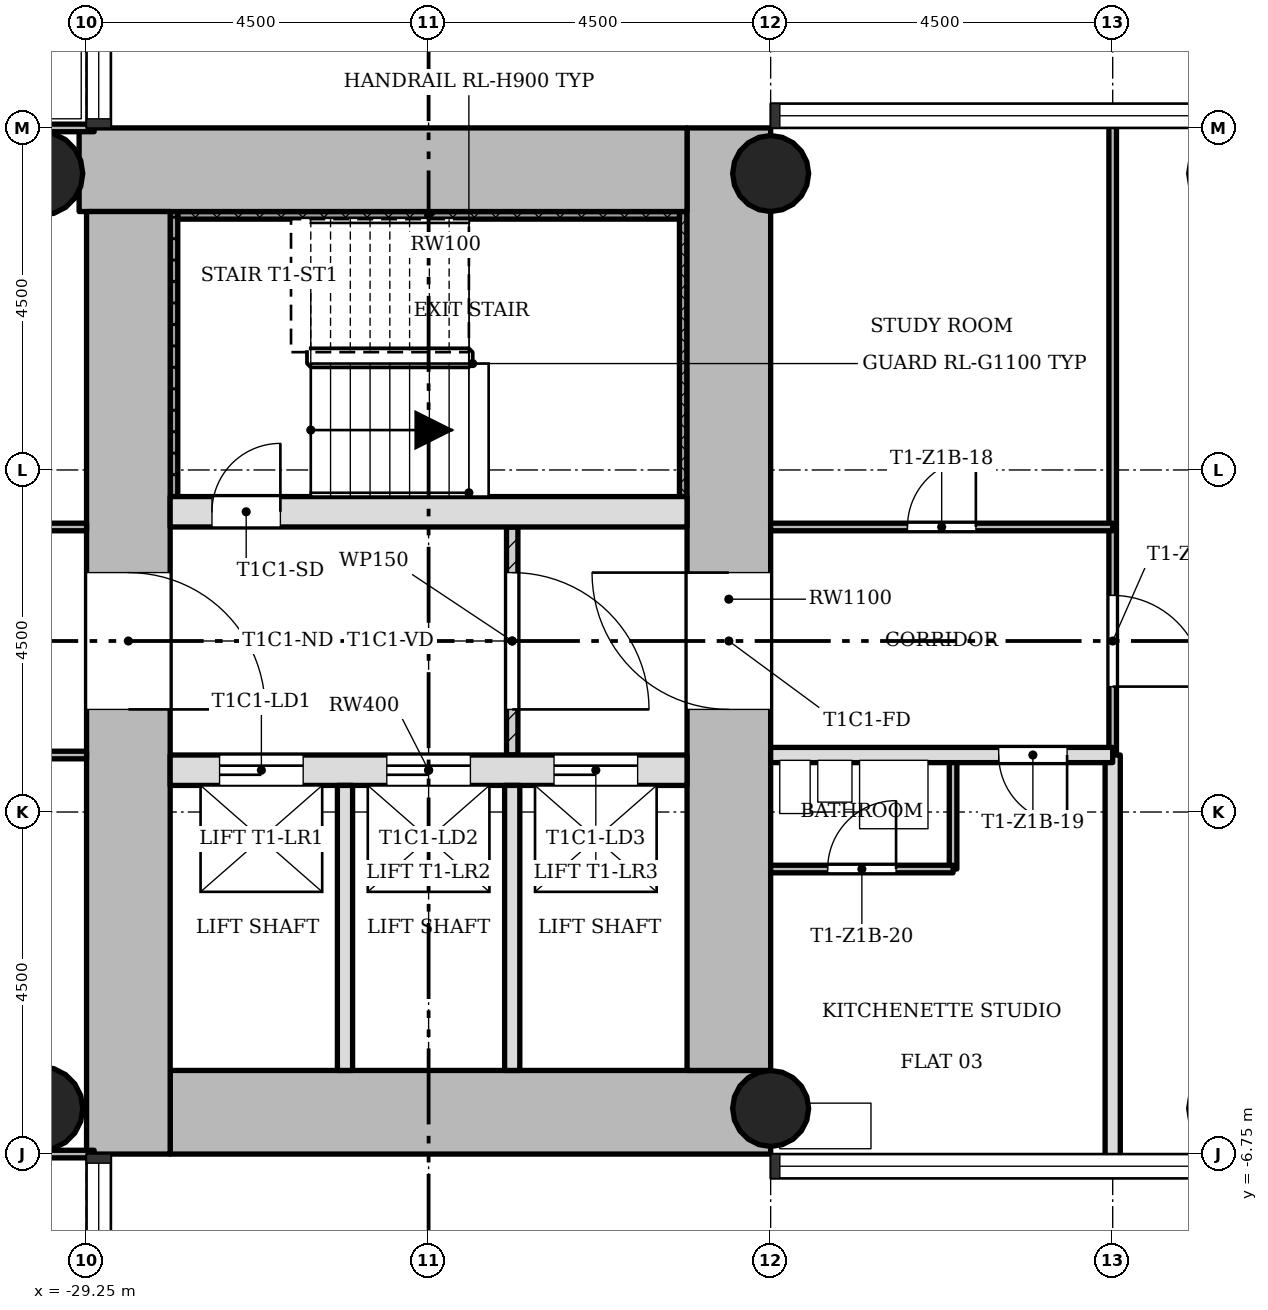
"""IFC4 building model, lengths in metres.
Left out: names, types, materials, properties, quantities, classifications, styles, units other than length and angle.
Written with IfcOpenShell. Run it as: python <this file> out.ifc"""

import sys

from ifc_helpers import new_model, si_unit, direction, frame, frame_2d, origin, origin_2d, place, context, subcontext, project, spatial, rectangle, hollow_circle, extrude, element, fill, save


model = new_model("IFC4")
c1 = context("Model", 3, precision=1e-05, world=origin(), true_north=direction((0.0, 1.0)))
c2 = subcontext(c1, "Body", "Model", "MODEL_VIEW")
j1 = project(units=[si_unit("LENGTHUNIT", "METRE"), si_unit("PLANEANGLEUNIT", "RADIAN")], contexts=[c1])
p1 = place(None, origin())
s1 = spatial("IfcSite", under=j1, at=p1, CompositionType="ELEMENT")
p2 = place(p1, origin())
s2 = spatial("IfcBuilding", under=s1, at=p2, CompositionType="ELEMENT")
p3 = place(p2, frame((0.0, 0.0, 41.5)))
s3 = spatial("IfcBuildingStorey", under=s2, at=p3, CompositionType="ELEMENT", Elevation=41.5)
p4 = place(p3, frame((-28.15, -6.2, 0.0), z_axis=(0.0, 0.0, 1.0), x_axis=(1.0, 0.0, 0.0)))
e1 = element("IfcWall", 1, at=p4, inside=s3, PredefinedType="SHEAR", context=c2, shape_type="SweptSolid", body=[
    extrude(rectangle(XDim=7.9, YDim=1.1, at=frame_2d((3.95, 0.0))), origin(), (0.0, 0.0, 1.0), 3.4),
])
p5 = place(p3, frame((-20.8, -5.65, 0.0), z_axis=(0.0, 0.0, 1.0), x_axis=(0.0, 1.0, 0.0)))
e2 = element("IfcWall", 2, at=p5, inside=s3, PredefinedType="SHEAR", context=c2, shape_type="SweptSolid", body=[
    extrude(rectangle(XDim=12.4, YDim=1.1, at=frame_2d((6.2, 0.0))), origin(), (0.0, 0.0, 1.0), 3.4),
])
p6 = place(p5, frame((4.75, 0.0, 0.0)))
e3 = element("IfcOpeningElement", 3, at=p6, cuts=e2, PredefinedType="OPENING", context=c2, shape_type="SweptSolid", body=[
    extrude(rectangle(XDim=1.8, YDim=2.1, at=frame_2d((0.9, 1.05))), frame((0.0, 0.56, 0.0), z_axis=(0.0, -1.0, 0.0), x_axis=(1.0, 0.0, 0.0)), (0.0, 0.0, 1.0), 1.12),
])
p7 = place(p3, frame((-21.35, 6.2, 0.0), z_axis=(0.0, 0.0, 1.0), x_axis=(-1.0, 0.0, 0.0)))
e4 = element("IfcWall", 4, at=p7, inside=s3, PredefinedType="SHEAR", context=c2, shape_type="SweptSolid", body=[
    extrude(rectangle(XDim=7.998, YDim=1.1, at=frame_2d((3.999, 0.0))), origin(), (0.0, 0.0, 1.0), 3.4),
])
p8 = place(p3, frame((-28.7, 5.65, 0.0), z_axis=(0.0, 0.0, 1.0), x_axis=(0.0, -1.0, 0.0)))
e5 = element("IfcWall", 5, at=p8, inside=s3, PredefinedType="SHEAR", context=c2, shape_type="SweptSolid", body=[
    extrude(rectangle(XDim=12.4, YDim=1.1, at=frame_2d((6.2, 0.0))), origin(), (0.0, 0.0, 1.0), 3.4),
])
p9 = place(p8, frame((4.75, 0.0, 0.0)))
e6 = element("IfcOpeningElement", 6, at=p9, cuts=e5, PredefinedType="OPENING", context=c2, shape_type="SweptSolid", body=[
    extrude(rectangle(XDim=1.8, YDim=2.1, at=frame_2d((0.9, 1.05))), frame((0.0, 0.56, 0.0), z_axis=(0.0, -1.0, 0.0), x_axis=(1.0, 0.0, 0.0)), (0.0, 0.0, 1.0), 1.12),
])
p10 = place(p3, frame((-28.15, -1.7, 0.0), z_axis=(0.0, 0.0, 1.0), x_axis=(1.0, 0.0, 0.0)))
e7 = element("IfcWall", 7, at=p10, inside=s3, PredefinedType="SHEAR", context=c2, shape_type="SweptSolid", body=[
    extrude(rectangle(XDim=6.8, YDim=0.4, at=frame_2d((3.4, 0.0))), origin(), (0.0, 0.0, 1.0), 3.4),
])
p11 = place(p10, frame((0.65, 0.0, 0.0)))
e8 = element("IfcOpeningElement", 8, at=p11, cuts=e7, PredefinedType="OPENING", context=c2, shape_type="SweptSolid", body=[
    extrude(rectangle(XDim=1.1, YDim=2.1, at=frame_2d((0.55, 1.05))), frame((0.0, 0.21, 0.0), z_axis=(0.0, -1.0, 0.0), x_axis=(1.0, 0.0, 0.0)), (0.0, 0.0, 1.0), 0.42),
])
p12 = place(p10, frame((2.85, 0.0, 0.0)))
e9 = element("IfcOpeningElement", 9, at=p12, cuts=e7, PredefinedType="OPENING", context=c2, shape_type="SweptSolid", body=[
    extrude(rectangle(XDim=1.1, YDim=2.1, at=frame_2d((0.55, 1.05))), frame((0.0, 0.21, 0.0), z_axis=(0.0, -1.0, 0.0), x_axis=(1.0, 0.0, 0.0)), (0.0, 0.0, 1.0), 0.42),
])
p13 = place(p10, frame((5.05, 0.0, 0.0)))
e10 = element("IfcOpeningElement", 10, at=p13, cuts=e7, PredefinedType="OPENING", context=c2, shape_type="SweptSolid", body=[
    extrude(rectangle(XDim=1.1, YDim=2.1, at=frame_2d((0.55, 1.05))), frame((0.0, 0.21, 0.0), z_axis=(0.0, -1.0, 0.0), x_axis=(1.0, 0.0, 0.0)), (0.0, 0.0, 1.0), 0.42),
])
p14 = place(p3, frame((-28.15, 1.7, 0.0), z_axis=(0.0, 0.0, 1.0), x_axis=(1.0, 0.0, 0.0)))
e11 = element("IfcWall", 11, at=p14, inside=s3, PredefinedType="SHEAR", context=c2, shape_type="SweptSolid", body=[
    extrude(rectangle(XDim=6.8, YDim=0.4, at=frame_2d((3.4, 0.0))), origin(), (0.0, 0.0, 1.0), 3.4),
])
p15 = place(p14, frame((0.55, 0.0, 0.0)))
e12 = element("IfcOpeningElement", 12, at=p15, cuts=e11, PredefinedType="OPENING", context=c2, shape_type="SweptSolid", body=[
    extrude(rectangle(XDim=0.9, YDim=2.1, at=frame_2d((0.45, 1.05))), frame((0.0, 0.21, 0.0), z_axis=(0.0, -1.0, 0.0), x_axis=(1.0, 0.0, 0.0)), (0.0, 0.0, 1.0), 0.42),
])
for number, where, z_axis, x_axis in (
    (13, (-20.25, -6.15, 0.0), (0.0, 0.0, 1.0), (1.0, 0.0, 0.0)),
    (14, (-20.25, 6.15, 0.0), (0.0, 0.0, 1.0), (1.0, 0.0, 0.0)),
):
    element("IfcColumn", number, at=place(p3, frame(where, z_axis=z_axis, x_axis=x_axis)), inside=s3, PredefinedType="COLUMN", context=c2, shape_type="SweptSolid", body=[
        extrude(hollow_circle(Radius=0.5, WallThickness=0.036, at=origin_2d()), origin(), (0.0, 0.0, 1.0), 3.4),
    ])
for number, where, z_axis, x_axis in (
    (15, (-29.85, -6.15, 0.0), (0.0, 0.0, 1.0), (1.0, 0.0, 0.0)),
    (16, (-29.85, 6.15, 0.0), (0.0, 0.0, 1.0), (1.0, 0.0, 0.0)),
):
    element("IfcColumn", number, at=place(p3, frame(where, z_axis=z_axis, x_axis=x_axis)), inside=s3, PredefinedType="COLUMN", context=c2, shape_type="SweptSolid", body=[
        extrude(hollow_circle(Radius=0.55, WallThickness=0.04, at=origin_2d()), origin(), (0.0, 0.0, 1.0), 3.4),
    ])
p16 = place(p3, frame((-23.65, -1.5, 0.0), z_axis=(0.0, 0.0, 1.0), x_axis=(0.0, 1.0, 0.0)))
e17 = element("IfcWall", 17, at=p16, inside=s3, PredefinedType="PARTITIONING", context=c2, shape_type="SweptSolid", body=[
    extrude(rectangle(XDim=3.0, YDim=0.15, at=frame_2d((1.5, 0.0))), origin(), (0.0, 0.0, 1.0), 3.0),
])
p17 = place(p16, frame((0.6, 0.0, 0.0)))
e18 = element("IfcOpeningElement", 18, at=p17, cuts=e17, PredefinedType="OPENING", context=c2, shape_type="SweptSolid", body=[
    extrude(rectangle(XDim=1.8, YDim=2.1, at=frame_2d((0.9, 1.05))), frame((0.0, 0.085, 0.0), z_axis=(0.0, -1.0, 0.0), x_axis=(1.0, 0.0, 0.0)), (0.0, 0.0, 1.0), 0.17),
])
for number, where, z_axis, x_axis in (
    (19, (-25.85, -5.65, 0.0), (0.0, 0.0, 1.0), (0.0, 1.0, 0.0)),
    (20, (-23.65, -5.65, 0.0), (0.0, 0.0, 1.0), (0.0, 1.0, 0.0)),
):
    element("IfcWall", number, at=place(p3, frame(where, z_axis=z_axis, x_axis=x_axis)), inside=s3, PredefinedType="SOLIDWALL", context=c2, shape_type="SweptSolid", body=[
        extrude(rectangle(XDim=3.75, YDim=0.2, at=frame_2d((1.875, 0.0))), origin(), (0.0, 0.0, 1.0), 3.0),
    ])
p18 = place(p3, frame((-17.85, -3.0, 0.0), z_axis=(0.0, 0.0, 1.0), x_axis=(0.0, 1.0, 0.0)))
e21 = element("IfcWall", 21, at=p18, inside=s3, PredefinedType="PARTITIONING", context=c2, shape_type="SweptSolid", body=[
    extrude(rectangle(XDim=1.5, YDim=0.1, at=frame_2d((0.75, 0.0))), origin(), (0.0, 0.0, 1.0), 3.0),
])
p19 = place(p3, frame((-15.75, -1.5, 0.0), z_axis=(0.0, 0.0, 1.0), x_axis=(0.0, 1.0, 0.0)))
e22 = element("IfcWall", 22, at=p19, inside=s3, PredefinedType="PARTITIONING", context=c2, shape_type="SweptSolid", body=[
    extrude(rectangle(XDim=8.35, YDim=0.1, at=frame_2d((4.175, 0.0))), origin(), (0.0, 0.0, 1.0), 3.0),
])
p20 = place(p19, frame((0.9, 0.0, 0.0)))
e23 = element("IfcOpeningElement", 23, at=p20, cuts=e22, PredefinedType="OPENING", context=c2, shape_type="SweptSolid", body=[
    extrude(rectangle(XDim=1.2, YDim=2.1, at=frame_2d((0.6, 1.05))), frame((0.0, 0.06, 0.0), z_axis=(0.0, -1.0, 0.0), x_axis=(1.0, 0.0, 0.0)), (0.0, 0.0, 1.0), 0.12),
])
p21 = place(p3, frame((-15.75, -6.85, 0.0), z_axis=(0.0, 0.0, 1.0), x_axis=(0.0, 1.0, 0.0)))
e24 = element("IfcWall", 24, at=p21, inside=s3, PredefinedType="SOLIDWALL", context=c2, shape_type="SweptSolid", body=[
    extrude(rectangle(XDim=5.35, YDim=0.2, at=frame_2d((2.675, 0.0))), origin(), (0.0, 0.0, 1.0), 3.0),
])
p22 = place(p3, frame((-35.1, -6.75, 0.0), z_axis=(0.0, 0.0, 1.0), x_axis=(1.0, 0.0, 0.0)))
e25 = element("IfcWall", 25, at=p22, inside=s3, PredefinedType="PARTITIONING", context=c2, shape_type="SweptSolid", body=[
    extrude(rectangle(XDim=5.95, YDim=0.1, at=frame_2d((2.975, 0.0))), origin(), (0.0, 0.0, 1.0), 3.0),
])
p23 = place(p3, frame((-20.25, -3.0, 0.0), z_axis=(0.0, 0.0, 1.0), x_axis=(1.0, 0.0, 0.0)))
e26 = element("IfcWall", 26, at=p23, inside=s3, PredefinedType="PARTITIONING", context=c2, shape_type="SweptSolid", body=[
    extrude(rectangle(XDim=2.4, YDim=0.1, at=frame_2d((1.2, 0.0))), origin(), (0.0, 0.0, 1.0), 3.0),
])
p24 = place(p23, frame((0.75, 0.0, 0.0)))
e27 = element("IfcOpeningElement", 27, at=p24, cuts=e26, PredefinedType="OPENING", context=c2, shape_type="SweptSolid", body=[
    extrude(rectangle(XDim=0.9, YDim=2.1, at=frame_2d((0.45, 1.05))), frame((0.0, 0.06, 0.0), z_axis=(0.0, -1.0, 0.0), x_axis=(1.0, 0.0, 0.0)), (0.0, 0.0, 1.0), 0.12),
])
p25 = place(p3, frame((-35.1, -1.5, 0.0), z_axis=(0.0, 0.0, 1.0), x_axis=(1.0, 0.0, 0.0)))
e28 = element("IfcWall", 28, at=p25, inside=s3, PredefinedType="PARTITIONING", context=c2, shape_type="SweptSolid", body=[
    extrude(rectangle(XDim=5.85, YDim=0.1, at=frame_2d((2.925, 0.0))), origin(), (0.0, 0.0, 1.0), 3.0),
])
p26 = place(p25, frame((2.475, 0.0, 0.0)))
e29 = element("IfcOpeningElement", 29, at=p26, cuts=e28, PredefinedType="OPENING", context=c2, shape_type="SweptSolid", body=[
    extrude(rectangle(XDim=0.9, YDim=2.1, at=frame_2d((0.45, 1.05))), frame((0.0, 0.06, 0.0), z_axis=(0.0, -1.0, 0.0), x_axis=(1.0, 0.0, 0.0)), (0.0, 0.0, 1.0), 0.12),
])
p27 = place(p3, frame((-20.25, -1.5, 0.0), z_axis=(0.0, 0.0, 1.0), x_axis=(1.0, 0.0, 0.0)))
e30 = element("IfcWall", 30, at=p27, inside=s3, PredefinedType="SOLIDWALL", context=c2, shape_type="SweptSolid", body=[
    extrude(rectangle(XDim=4.5, YDim=0.2, at=frame_2d((2.25, 0.0))), origin(), (0.0, 0.0, 1.0), 3.0),
])
p28 = place(p27, frame((3.0, 0.0, 0.0)))
e31 = element("IfcOpeningElement", 31, at=p28, cuts=e30, PredefinedType="OPENING", context=c2, shape_type="SweptSolid", body=[
    extrude(rectangle(XDim=0.9, YDim=2.1, at=frame_2d((0.45, 1.05))), frame((0.0, 0.11, 0.0), z_axis=(0.0, -1.0, 0.0), x_axis=(1.0, 0.0, 0.0)), (0.0, 0.0, 1.0), 0.22),
])
p29 = place(p3, frame((-35.1, 1.5, 0.0), z_axis=(0.0, 0.0, 1.0), x_axis=(1.0, 0.0, 0.0)))
e32 = element("IfcWall", 32, at=p29, inside=s3, PredefinedType="PARTITIONING", context=c2, shape_type="SweptSolid", body=[
    extrude(rectangle(XDim=5.85, YDim=0.1, at=frame_2d((2.925, 0.0))), origin(), (0.0, 0.0, 1.0), 3.0),
])
p30 = place(p29, frame((3.375, 0.0, 0.0)))
e33 = element("IfcOpeningElement", 33, at=p30, cuts=e32, PredefinedType="OPENING", context=c2, shape_type="SweptSolid", body=[
    extrude(rectangle(XDim=0.9, YDim=2.1, at=frame_2d((0.45, 1.05))), frame((0.0, 0.06, 0.0), z_axis=(0.0, -1.0, 0.0), x_axis=(1.0, 0.0, 0.0)), (0.0, 0.0, 1.0), 0.12),
])
p31 = place(p3, frame((-20.25, 1.5, 0.0), z_axis=(0.0, 0.0, 1.0), x_axis=(1.0, 0.0, 0.0)))
e34 = element("IfcWall", 34, at=p31, inside=s3, PredefinedType="PARTITIONING", context=c2, shape_type="SweptSolid", body=[
    extrude(rectangle(XDim=4.5, YDim=0.1, at=frame_2d((2.25, 0.0))), origin(), (0.0, 0.0, 1.0), 3.0),
])
p32 = place(p31, frame((1.8, 0.0, 0.0)))
e35 = element("IfcOpeningElement", 35, at=p32, cuts=e34, PredefinedType="OPENING", context=c2, shape_type="SweptSolid", body=[
    extrude(rectangle(XDim=0.9, YDim=2.1, at=frame_2d((0.45, 1.05))), frame((0.0, 0.06, 0.0), z_axis=(0.0, -1.0, 0.0), x_axis=(1.0, 0.0, 0.0)), (0.0, 0.0, 1.0), 0.12),
])
p33 = place(p3, frame((-35.1, 6.75, 0.0), z_axis=(0.0, 0.0, 1.0), x_axis=(1.0, 0.0, 0.0)))
e36 = element("IfcWall", 36, at=p33, inside=s3, PredefinedType="PARTITIONING", context=c2, shape_type="SweptSolid", body=[
    extrude(rectangle(XDim=5.95, YDim=0.1, at=frame_2d((2.975, 0.0))), origin(), (0.0, 0.0, 1.0), 3.0),
])
p34 = place(p3, frame((-21.4, 1.9, 0.0), z_axis=(0.0, 0.0, 1.0), x_axis=(0.0, 1.0, 0.0)))
e37 = element("IfcWall", 37, at=p34, inside=s3, PredefinedType="SHEAR", context=c2, shape_type="SweptSolid", body=[
    extrude(rectangle(XDim=3.75, YDim=0.1, at=frame_2d((1.875, 0.0))), origin(), (0.0, 0.0, 1.0), 3.4),
])
p35 = place(p3, frame((-28.05, 5.6, 0.0), z_axis=(0.0, 0.0, 1.0), x_axis=(1.0, 0.0, 0.0)))
e38 = element("IfcWall", 38, at=p35, inside=s3, PredefinedType="SHEAR", context=c2, shape_type="SweptSolid", body=[
    extrude(rectangle(XDim=6.6, YDim=0.1, at=frame_2d((3.3, 0.0))), origin(), (0.0, 0.0, 1.0), 3.4),
])
p36 = place(p3, frame((-28.1, 1.9, 0.0), z_axis=(0.0, 0.0, 1.0), x_axis=(0.0, 1.0, 0.0)))
e39 = element("IfcWall", 39, at=p36, inside=s3, PredefinedType="SHEAR", context=c2, shape_type="SweptSolid", body=[
    extrude(rectangle(XDim=3.75, YDim=0.1, at=frame_2d((1.875, 0.0))), origin(), (0.0, 0.0, 1.0), 3.4),
])
p37 = place(p17, origin())
e40 = element("IfcDoor", 40, at=p37, inside=s3, OperationType="SINGLE_SWING_LEFT", PredefinedType="DOOR", context=c2, shape_type="SweptSolid", body=[
    extrude(rectangle(XDim=1.8, YDim=2.1, at=frame_2d((0.9, 1.05))), frame((0.0, 0.025, 0.0), z_axis=(0.0, -1.0, 0.0), x_axis=(1.0, 0.0, 0.0)), (0.0, 0.0, 1.0), 0.05),
])
fill(e18, e40)
p38 = place(p32, origin())
e41 = element("IfcDoor", 41, at=p38, inside=s3, OperationType="SINGLE_SWING_LEFT", PredefinedType="DOOR", context=c2, shape_type="SweptSolid", body=[
    extrude(rectangle(XDim=0.9, YDim=2.1, at=frame_2d((0.45, 1.05))), frame((0.0, 0.025, 0.0), z_axis=(0.0, -1.0, 0.0), x_axis=(1.0, 0.0, 0.0)), (0.0, 0.0, 1.0), 0.05),
])
fill(e35, e41)
p39 = place(p28, origin())
e42 = element("IfcDoor", 42, at=p39, inside=s3, OperationType="SINGLE_SWING_RIGHT", PredefinedType="DOOR", context=c2, shape_type="SweptSolid", body=[
    extrude(rectangle(XDim=0.9, YDim=2.1, at=frame_2d((0.45, 1.05))), frame((0.0, 0.025, 0.0), z_axis=(0.0, -1.0, 0.0), x_axis=(1.0, 0.0, 0.0)), (0.0, 0.0, 1.0), 0.05),
])
fill(e31, e42)
p40 = place(p24, origin())
e43 = element("IfcDoor", 43, at=p40, inside=s3, OperationType="SINGLE_SWING_LEFT", PredefinedType="DOOR", context=c2, shape_type="SweptSolid", body=[
    extrude(rectangle(XDim=0.9, YDim=2.1, at=frame_2d((0.45, 1.05))), frame((0.0, 0.025, 0.0), z_axis=(0.0, -1.0, 0.0), x_axis=(1.0, 0.0, 0.0)), (0.0, 0.0, 1.0), 0.05),
])
fill(e27, e43)
p41 = place(p20, origin())
e44 = element("IfcDoor", 44, at=p41, inside=s3, OperationType="SINGLE_SWING_LEFT", PredefinedType="DOOR", context=c2, shape_type="SweptSolid", body=[
    extrude(rectangle(XDim=1.2, YDim=2.1, at=frame_2d((0.6, 1.05))), frame((0.0, 0.025, 0.0), z_axis=(0.0, -1.0, 0.0), x_axis=(1.0, 0.0, 0.0)), (0.0, 0.0, 1.0), 0.05),
])
fill(e23, e44)
p42 = place(p15, origin())
e45 = element("IfcDoor", 45, at=p42, inside=s3, OperationType="SINGLE_SWING_LEFT", PredefinedType="DOOR", context=c2, shape_type="SweptSolid", body=[
    extrude(rectangle(XDim=0.9, YDim=2.1, at=frame_2d((0.45, 1.05))), frame((0.0, 0.025, 0.0), z_axis=(0.0, -1.0, 0.0), x_axis=(1.0, 0.0, 0.0)), (0.0, 0.0, 1.0), 0.05),
])
fill(e12, e45)
p43 = place(p11, origin())
e46 = element("IfcDoor", 46, at=p43, inside=s3, OperationType="SLIDING_TO_LEFT", PredefinedType="DOOR", context=c2, shape_type="SweptSolid", body=[
    extrude(rectangle(XDim=1.1, YDim=2.1, at=frame_2d((0.55, 1.05))), frame((0.0, 0.025, 0.0), z_axis=(0.0, -1.0, 0.0), x_axis=(1.0, 0.0, 0.0)), (0.0, 0.0, 1.0), 0.05),
])
fill(e8, e46)
p44 = place(p12, origin())
e47 = element("IfcDoor", 47, at=p44, inside=s3, OperationType="SLIDING_TO_LEFT", PredefinedType="DOOR", context=c2, shape_type="SweptSolid", body=[
    extrude(rectangle(XDim=1.1, YDim=2.1, at=frame_2d((0.55, 1.05))), frame((0.0, 0.025, 0.0), z_axis=(0.0, -1.0, 0.0), x_axis=(1.0, 0.0, 0.0)), (0.0, 0.0, 1.0), 0.05),
])
fill(e9, e47)
p45 = place(p13, origin())
e48 = element("IfcDoor", 48, at=p45, inside=s3, OperationType="SLIDING_TO_LEFT", PredefinedType="DOOR", context=c2, shape_type="SweptSolid", body=[
    extrude(rectangle(XDim=1.1, YDim=2.1, at=frame_2d((0.55, 1.05))), frame((0.0, 0.025, 0.0), z_axis=(0.0, -1.0, 0.0), x_axis=(1.0, 0.0, 0.0)), (0.0, 0.0, 1.0), 0.05),
])
fill(e10, e48)
p46 = place(p9, origin())
e49 = element("IfcDoor", 49, at=p46, inside=s3, OperationType="SINGLE_SWING_LEFT", PredefinedType="DOOR", context=c2, shape_type="SweptSolid", body=[
    extrude(rectangle(XDim=1.8, YDim=2.1, at=frame_2d((0.9, 1.05))), frame((0.0, 0.025, 0.0), z_axis=(0.0, -1.0, 0.0), x_axis=(1.0, 0.0, 0.0)), (0.0, 0.0, 1.0), 0.05),
])
fill(e6, e49)
p47 = place(p6, origin())
e50 = element("IfcDoor", 50, at=p47, inside=s3, OperationType="SINGLE_SWING_LEFT", PredefinedType="DOOR", context=c2, shape_type="SweptSolid", body=[
    extrude(rectangle(XDim=1.8, YDim=2.1, at=frame_2d((0.9, 1.05))), frame((0.0, 0.025, 0.0), z_axis=(0.0, -1.0, 0.0), x_axis=(1.0, 0.0, 0.0)), (0.0, 0.0, 1.0), 0.05),
])
fill(e3, e50)
save(model, sys.argv[1])
